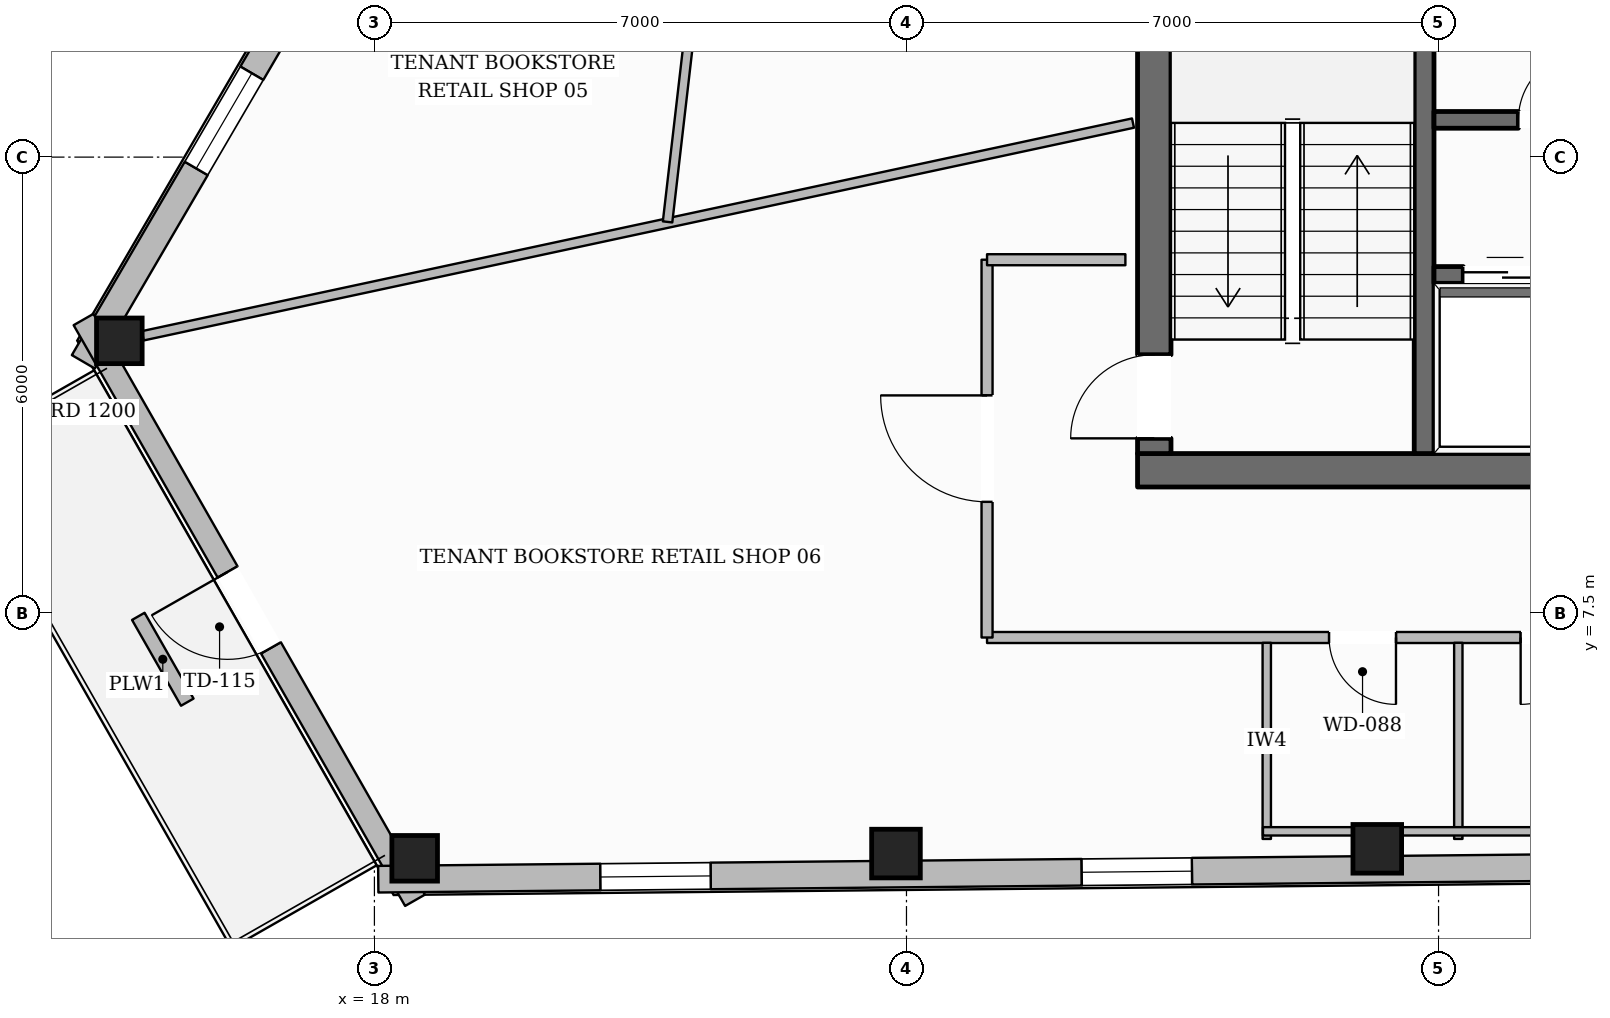
"""IFC4 building model, lengths in metres.
Left out: names, types, materials, properties, quantities, classifications, styles, units other than length and angle.
Written with IfcOpenShell. Run it as: python <this file> out.ifc"""

import sys

from ifc_helpers import new_model, si_unit, direction, frame, frame_2d, origin, origin_2d, place, context, subcontext, project, spatial, rectangle, hollow_rectangle, extrude, element, fill, save


model = new_model("IFC4")
c1 = context("Model", 3, precision=1e-05, world=origin(), true_north=direction((0.0, 1.0)))
c2 = subcontext(c1, "Body", "Model", "MODEL_VIEW")
j1 = project(units=[si_unit("LENGTHUNIT", "METRE"), si_unit("PLANEANGLEUNIT", "RADIAN")], contexts=[c1])
p1 = place(None, origin())
s1 = spatial("IfcSite", under=j1, at=p1, CompositionType="ELEMENT")
p2 = place(p1, origin())
s2 = spatial("IfcBuilding", under=s1, at=p2, CompositionType="ELEMENT")
p3 = place(p2, frame((0.0, 0.0, 218.9)))
s3 = spatial("IfcBuildingStorey", under=s2, at=p3, CompositionType="ELEMENT", Elevation=218.9)
p4 = place(p3, frame((28.04, 9.38, 0.0), z_axis=(0.0, 0.0, 1.0), x_axis=(1.0, 0.0, 0.0)))
e1 = element("IfcWall", 1, at=p4, inside=s3, PredefinedType="SOLIDWALL", context=c2, shape_type="SweptSolid", body=[
    extrude(rectangle(XDim=19.92, YDim=0.44, at=frame_2d((9.96, 0.0))), origin(), (0.0, 0.0, 1.0), 3.6),
])
p5 = place(p4, frame((10.46, 0.0, 0.0)))
e2 = element("IfcOpeningElement", 2, at=p5, cuts=e1, PredefinedType="OPENING", context=c2, shape_type="SweptSolid", body=[
    extrude(rectangle(XDim=1.4, YDim=2.2, at=frame_2d((0.7, 1.1))), frame((0.0, 0.23, 0.0), z_axis=(0.0, -1.0, 0.0), x_axis=(1.0, 0.0, 0.0)), (0.0, 0.0, 1.0), 0.46),
])
p6 = place(p3, frame((28.26, 9.6, 0.0), z_axis=(0.0, 0.0, 1.0), x_axis=(0.0, 1.0, 0.0)))
e3 = element("IfcWall", 3, at=p6, inside=s3, PredefinedType="SOLIDWALL", context=c2, shape_type="SweptSolid", body=[
    extrude(rectangle(XDim=13.0, YDim=0.44, at=frame_2d((6.5, 0.0))), origin(), (0.0, 0.0, 1.0), 3.6),
])
p7 = place(p6, frame((0.2, 0.0, 0.0)))
e4 = element("IfcOpeningElement", 4, at=p7, cuts=e3, PredefinedType="OPENING", context=c2, shape_type="SweptSolid", body=[
    extrude(rectangle(XDim=1.1, YDim=2.15, at=frame_2d((0.55, 1.075))), frame((0.0, 0.23, 0.0), z_axis=(0.0, -1.0, 0.0), x_axis=(1.0, 0.0, 0.0)), (0.0, 0.0, 1.0), 0.46),
])
p8 = place(p6, frame((8.4, 0.0, 0.0)))
e5 = element("IfcOpeningElement", 5, at=p8, cuts=e3, PredefinedType="OPENING", context=c2, shape_type="SweptSolid", body=[
    extrude(rectangle(XDim=0.9, YDim=2.1, at=frame_2d((0.45, 1.05))), frame((0.0, 0.23, 0.0), z_axis=(0.0, -1.0, 0.0), x_axis=(1.0, 0.0, 0.0)), (0.0, 0.0, 1.0), 0.46),
])
p9 = place(p3, frame((31.81, 9.6, 0.0), z_axis=(0.0, 0.0, 1.0), x_axis=(0.0, 1.0, 0.0)))
e6 = element("IfcWall", 6, at=p9, inside=s3, PredefinedType="SHEAR", context=c2, shape_type="SweptSolid", body=[
    extrude(rectangle(XDim=13.0, YDim=0.26, at=frame_2d((6.5, 0.0))), origin(), (0.0, 0.0, 1.0), 3.6),
])
p10 = place(p9, frame((10.925, 0.0, 0.0)))
e7 = element("IfcOpeningElement", 7, at=p10, cuts=e6, PredefinedType="OPENING", context=c2, shape_type="SweptSolid", body=[
    extrude(rectangle(XDim=1.25, YDim=2.25, at=frame_2d((0.625, 1.125))), frame((0.0, 0.14, 0.0), z_axis=(0.0, -1.0, 0.0), x_axis=(1.0, 0.0, 0.0)), (0.0, 0.0, 1.0), 0.28),
])
p11 = place(p3, frame((31.94, 13.99, 0.0), z_axis=(0.0, 0.0, 1.0), x_axis=(1.0, 0.0, 0.0)))
e8 = element("IfcWall", 8, at=p11, inside=s3, PredefinedType="SOLIDWALL", context=c2, shape_type="SweptSolid", body=[
    extrude(rectangle(XDim=12.12, YDim=0.22, at=frame_2d((6.06, 0.0))), origin(), (0.0, 0.0, 1.0), 3.6),
])
p12 = place(p11, frame((1.11, 0.0, 0.0)))
e9 = element("IfcOpeningElement", 9, at=p12, cuts=e8, PredefinedType="OPENING", context=c2, shape_type="SweptSolid", body=[
    extrude(rectangle(XDim=0.9, YDim=2.1, at=frame_2d((0.45, 1.05))), frame((0.0, 0.12, 0.0), z_axis=(0.0, -1.0, 0.0), x_axis=(1.0, 0.0, 0.0)), (0.0, 0.0, 1.0), 0.24),
])
p13 = place(p11, frame((5.16, 0.0, 0.0)))
e10 = element("IfcOpeningElement", 10, at=p13, cuts=e8, PredefinedType="OPENING", context=c2, shape_type="SweptSolid", body=[
    extrude(rectangle(XDim=0.9, YDim=2.1, at=frame_2d((0.45, 1.05))), frame((0.0, 0.12, 0.0), z_axis=(0.0, -1.0, 0.0), x_axis=(1.0, 0.0, 0.0)), (0.0, 0.0, 1.0), 0.24),
])
p14 = place(p11, frame((9.61, 0.0, 0.0)))
e11 = element("IfcOpeningElement", 11, at=p14, cuts=e8, PredefinedType="OPENING", context=c2, shape_type="SweptSolid", body=[
    extrude(rectangle(XDim=0.9, YDim=2.1, at=frame_2d((0.45, 1.05))), frame((0.0, 0.12, 0.0), z_axis=(0.0, -1.0, 0.0), x_axis=(1.0, 0.0, 0.0)), (0.0, 0.0, 1.0), 0.24),
])
p15 = place(p3, frame((31.94, 11.95, 0.0), z_axis=(0.0, 0.0, 1.0), x_axis=(1.0, 0.0, 0.0)))
e12 = element("IfcWall", 12, at=p15, inside=s3, PredefinedType="SOLIDWALL", context=c2, shape_type="SweptSolid", body=[
    extrude(rectangle(XDim=6.19, YDim=0.22, at=frame_2d((3.095, 0.0))), origin(), (0.0, 0.0, 1.0), 3.6),
])
p16 = place(p15, frame((0.385, 0.0, 0.0)))
e13 = element("IfcOpeningElement", 13, at=p16, cuts=e12, PredefinedType="OPENING", context=c2, shape_type="SweptSolid", body=[
    extrude(rectangle(XDim=1.1, YDim=2.2, at=frame_2d((0.55, 1.1))), frame((0.0, 0.12, 0.0), z_axis=(0.0, -1.0, 0.0), x_axis=(1.0, 0.0, 0.0)), (0.0, 0.0, 1.0), 0.24),
])
p17 = place(p15, frame((2.435, 0.0, 0.0)))
e14 = element("IfcOpeningElement", 14, at=p17, cuts=e12, PredefinedType="OPENING", context=c2, shape_type="SweptSolid", body=[
    extrude(rectangle(XDim=1.1, YDim=2.2, at=frame_2d((0.55, 1.1))), frame((0.0, 0.12, 0.0), z_axis=(0.0, -1.0, 0.0), x_axis=(1.0, 0.0, 0.0)), (0.0, 0.0, 1.0), 0.24),
])
p18 = place(p15, frame((4.485, 0.0, 0.0)))
e15 = element("IfcOpeningElement", 15, at=p18, cuts=e12, PredefinedType="OPENING", context=c2, shape_type="SweptSolid", body=[
    extrude(rectangle(XDim=1.1, YDim=2.2, at=frame_2d((0.55, 1.1))), frame((0.0, 0.12, 0.0), z_axis=(0.0, -1.0, 0.0), x_axis=(1.0, 0.0, 0.0)), (0.0, 0.0, 1.0), 0.24),
])
for number, where, z_axis, x_axis in (
    (16, (14.644, 11.083, 0.0), (0.0, 0.0, 1.0), (1.0, 0.0, 0.0)),
    (17, (18.53, 4.275, 0.0), (0.0, 0.0, 1.0), (1.0, 0.0, 0.0)),
):
    element("IfcColumn", number, at=place(p3, frame(where, z_axis=z_axis, x_axis=x_axis)), inside=s3, PredefinedType="COLUMN", context=c2, shape_type="SweptSolid", body=[
        extrude(hollow_rectangle(XDim=0.6, YDim=0.6, WallThickness=0.028, at=origin_2d()), origin(), (0.0, 0.0, 1.0), 3.6),
    ])
for number, where, z_axis, x_axis in (
    (18, (24.862, 4.337, 0.0), (0.0, 0.0, 1.0), (1.0, 0.0, 0.0)),
    (19, (31.194, 4.4, 0.0), (0.0, 0.0, 1.0), (1.0, 0.0, 0.0)),
):
    element("IfcColumn", number, at=place(p3, frame(where, z_axis=z_axis, x_axis=x_axis)), inside=s3, PredefinedType="COLUMN", context=c2, shape_type="SweptSolid", body=[
        extrude(hollow_rectangle(XDim=0.64, YDim=0.64, WallThickness=0.028, at=origin_2d()), origin(), (0.0, 0.0, 1.0), 3.6),
    ])
p19 = place(p3, frame((14.171, 10.807, 0.0), z_axis=(0.0, 0.0, 1.0), x_axis=(0.504226548845, 0.86357141421, 0.0)))
e20 = element("IfcWall", 20, at=p19, inside=s3, PredefinedType="STANDARD", context=c2, shape_type="SweptSolid", body=[
    extrude(rectangle(XDim=39.276, YDim=0.35, at=frame_2d((19.638, 0.0))), origin(), (0.0, 0.0, 1.0), 3.132),
])
p20 = place(p19, frame((34.885, 0.0, 0.65)))
e21 = element("IfcOpeningElement", 21, at=p20, cuts=e20, PredefinedType="OPENING", context=c2, shape_type="SweptSolid", body=[
    extrude(rectangle(XDim=1.45, YDim=1.75, at=frame_2d((0.725, 0.875))), frame((0.0, 0.185, 0.0), z_axis=(0.0, -1.0, 0.0), x_axis=(1.0, 0.0, 0.0)), (0.0, 0.0, 1.0), 0.37),
])
p21 = place(p19, frame((28.497, 0.0, 0.65)))
e22 = element("IfcOpeningElement", 22, at=p21, cuts=e20, PredefinedType="OPENING", context=c2, shape_type="SweptSolid", body=[
    extrude(rectangle(XDim=1.45, YDim=1.75, at=frame_2d((0.725, 0.875))), frame((0.0, 0.185, 0.0), z_axis=(0.0, -1.0, 0.0), x_axis=(1.0, 0.0, 0.0)), (0.0, 0.0, 1.0), 0.37),
])
p22 = place(p19, frame((15.722, 0.0, 0.65)))
e23 = element("IfcOpeningElement", 23, at=p22, cuts=e20, PredefinedType="OPENING", context=c2, shape_type="SweptSolid", body=[
    extrude(rectangle(XDim=1.45, YDim=1.75, at=frame_2d((0.725, 0.875))), frame((0.0, 0.185, 0.0), z_axis=(0.0, -1.0, 0.0), x_axis=(1.0, 0.0, 0.0)), (0.0, 0.0, 1.0), 0.37),
])
p23 = place(p19, frame((9.334, 0.0, 0.65)))
e24 = element("IfcOpeningElement", 24, at=p23, cuts=e20, PredefinedType="OPENING", context=c2, shape_type="SweptSolid", body=[
    extrude(rectangle(XDim=1.45, YDim=1.75, at=frame_2d((0.725, 0.875))), frame((0.0, 0.185, 0.0), z_axis=(0.0, -1.0, 0.0), x_axis=(1.0, 0.0, 0.0)), (0.0, 0.0, 1.0), 0.37),
])
p24 = place(p19, frame((2.946, 0.0, 0.65)))
e25 = element("IfcOpeningElement", 25, at=p24, cuts=e20, PredefinedType="OPENING", context=c2, shape_type="SweptSolid", body=[
    extrude(rectangle(XDim=1.45, YDim=1.75, at=frame_2d((0.725, 0.875))), frame((0.0, 0.185, 0.0), z_axis=(0.0, -1.0, 0.0), x_axis=(1.0, 0.0, 0.0)), (0.0, 0.0, 1.0), 0.37),
])
p25 = place(p3, frame((18.534, 3.723, 0.0), z_axis=(0.0, 0.0, 1.0), x_axis=(-0.495678638022, 0.86850600908, 0.0)))
e26 = element("IfcWall", 26, at=p25, inside=s3, PredefinedType="STANDARD", context=c2, shape_type="SweptSolid", body=[
    extrude(rectangle(XDim=8.798, YDim=0.3, at=frame_2d((4.399, 0.0))), origin(), (0.0, 0.0, 1.0), 3.132),
])
p26 = place(p25, frame((3.824, 0.0, 0.0)))
e27 = element("IfcOpeningElement", 27, at=p26, cuts=e26, PredefinedType="OPENING", context=c2, shape_type="SweptSolid", body=[
    extrude(rectangle(XDim=1.15, YDim=2.2, at=frame_2d((0.575, 1.1))), frame((0.0, 0.16, 0.0), z_axis=(0.0, -1.0, 0.0), x_axis=(1.0, 0.0, 0.0)), (0.0, 0.0, 1.0), 0.32),
])
p27 = place(p3, frame((56.998, 4.385, 0.0), z_axis=(0.0, 0.0, 1.0), x_axis=(-0.999951327982, -0.009866188108, 0.0)))
e28 = element("IfcWall", 28, at=p27, inside=s3, PredefinedType="STANDARD", context=c2, shape_type="SweptSolid", body=[
    extrude(rectangle(XDim=38.949, YDim=0.35, at=frame_2d((19.475, 0.0))), origin(), (0.0, 0.0, 1.0), 3.132),
])
p28 = place(p27, frame((34.576, 0.0, 0.65)))
e29 = element("IfcOpeningElement", 29, at=p28, cuts=e28, PredefinedType="OPENING", context=c2, shape_type="SweptSolid", body=[
    extrude(rectangle(XDim=1.45, YDim=1.75, at=frame_2d((0.725, 0.875))), frame((0.0, 0.185, 0.0), z_axis=(0.0, -1.0, 0.0), x_axis=(1.0, 0.0, 0.0)), (0.0, 0.0, 1.0), 0.37),
])
p29 = place(p27, frame((28.243, 0.0, 0.65)))
e30 = element("IfcOpeningElement", 30, at=p29, cuts=e28, PredefinedType="OPENING", context=c2, shape_type="SweptSolid", body=[
    extrude(rectangle(XDim=1.45, YDim=1.75, at=frame_2d((0.725, 0.875))), frame((0.0, 0.185, 0.0), z_axis=(0.0, -1.0, 0.0), x_axis=(1.0, 0.0, 0.0)), (0.0, 0.0, 1.0), 0.37),
])
p30 = place(p27, frame((15.579, 0.0, 0.65)))
e31 = element("IfcOpeningElement", 31, at=p30, cuts=e28, PredefinedType="OPENING", context=c2, shape_type="SweptSolid", body=[
    extrude(rectangle(XDim=1.45, YDim=1.75, at=frame_2d((0.725, 0.875))), frame((0.0, 0.185, 0.0), z_axis=(0.0, -1.0, 0.0), x_axis=(1.0, 0.0, 0.0)), (0.0, 0.0, 1.0), 0.37),
])
p31 = place(p27, frame((9.246, 0.0, 0.65)))
e32 = element("IfcOpeningElement", 32, at=p31, cuts=e28, PredefinedType="OPENING", context=c2, shape_type="SweptSolid", body=[
    extrude(rectangle(XDim=1.45, YDim=1.75, at=frame_2d((0.725, 0.875))), frame((0.0, 0.185, 0.0), z_axis=(0.0, -1.0, 0.0), x_axis=(1.0, 0.0, 0.0)), (0.0, 0.0, 1.0), 0.37),
])
p32 = place(p27, frame((2.914, 0.0, 0.65)))
e33 = element("IfcOpeningElement", 33, at=p32, cuts=e28, PredefinedType="OPENING", context=c2, shape_type="SweptSolid", body=[
    extrude(rectangle(XDim=1.45, YDim=1.75, at=frame_2d((0.725, 0.875))), frame((0.0, 0.185, 0.0), z_axis=(0.0, -1.0, 0.0), x_axis=(1.0, 0.0, 0.0)), (0.0, 0.0, 1.0), 0.37),
])
p33 = place(p3, frame((14.894, 7.458, 0.0), z_axis=(0.0, 0.0, 1.0), x_axis=(0.495592788195, -0.868555000152, 0.0)))
e34 = element("IfcWall", 34, at=p33, inside=s3, PredefinedType="USERDEFINED", context=c2, shape_type="SweptSolid", body=[
    extrude(rectangle(XDim=1.3, YDim=0.19, at=frame_2d((0.65, 0.0))), origin(), (0.0, 0.0, 1.0), 0.52),
])
p34 = place(p3, frame((49.94, 7.18, 0.0), z_axis=(0.0, 0.0, 1.0), x_axis=(-1.0, 0.0, 0.0)))
e35 = element("IfcWall", 35, at=p34, inside=s3, PredefinedType="PARTITIONING", context=c2, shape_type="SweptSolid", body=[
    extrude(rectangle(XDim=23.88, YDim=0.145, at=frame_2d((11.94, 0.0))), origin(), (0.0, 0.0, 1.0), 3.6),
])
p35 = place(p34, frame((18.5, 0.0, 0.0)))
e36 = element("IfcOpeningElement", 36, at=p35, cuts=e35, PredefinedType="OPENING", context=c2, shape_type="SweptSolid", body=[
    extrude(rectangle(XDim=0.88, YDim=2.1, at=frame_2d((0.44, 1.05))), frame((0.0, 0.083, 0.0), z_axis=(0.0, -1.0, 0.0), x_axis=(1.0, 0.0, 0.0)), (0.0, 0.0, 1.0), 0.165),
])
p36 = place(p34, frame((15.98, 0.0, 0.0)))
e37 = element("IfcOpeningElement", 37, at=p36, cuts=e35, PredefinedType="OPENING", context=c2, shape_type="SweptSolid", body=[
    extrude(rectangle(XDim=0.88, YDim=2.1, at=frame_2d((0.44, 1.05))), frame((0.0, 0.083, 0.0), z_axis=(0.0, -1.0, 0.0), x_axis=(1.0, 0.0, 0.0)), (0.0, 0.0, 1.0), 0.165),
])
p37 = place(p34, frame((13.52, 0.0, 0.0)))
e38 = element("IfcOpeningElement", 38, at=p37, cuts=e35, PredefinedType="OPENING", context=c2, shape_type="SweptSolid", body=[
    extrude(rectangle(XDim=0.96, YDim=2.1, at=frame_2d((0.48, 1.05))), frame((0.0, 0.083, 0.0), z_axis=(0.0, -1.0, 0.0), x_axis=(1.0, 0.0, 0.0)), (0.0, 0.0, 1.0), 0.165),
])
p38 = place(p34, frame((7.332, 0.0, 0.0)))
e39 = element("IfcOpeningElement", 39, at=p38, cuts=e35, PredefinedType="OPENING", context=c2, shape_type="SweptSolid", body=[
    extrude(rectangle(XDim=0.98, YDim=2.15, at=frame_2d((0.49, 1.075))), frame((0.0, 0.083, 0.0), z_axis=(0.0, -1.0, 0.0), x_axis=(1.0, 0.0, 0.0)), (0.0, 0.0, 1.0), 0.165),
])
p39 = place(p34, frame((0.707, 0.0, 0.0)))
e40 = element("IfcOpeningElement", 40, at=p39, cuts=e35, PredefinedType="OPENING", context=c2, shape_type="SweptSolid", body=[
    extrude(rectangle(XDim=0.98, YDim=2.15, at=frame_2d((0.49, 1.075))), frame((0.0, 0.083, 0.0), z_axis=(0.0, -1.0, 0.0), x_axis=(1.0, 0.0, 0.0)), (0.0, 0.0, 1.0), 0.165),
])
p40 = place(p3, frame((26.06, 7.18, 0.0), z_axis=(0.0, 0.0, 1.0), x_axis=(0.0, 1.0, 0.0)))
e41 = element("IfcWall", 41, at=p40, inside=s3, PredefinedType="PARTITIONING", context=c2, shape_type="SweptSolid", body=[
    extrude(rectangle(XDim=4.97, YDim=0.145, at=frame_2d((2.485, 0.0))), origin(), (0.0, 0.0, 1.0), 3.6),
])
p41 = place(p40, frame((1.785, 0.0, 0.0)))
e42 = element("IfcOpeningElement", 42, at=p41, cuts=e41, PredefinedType="OPENING", context=c2, shape_type="SweptSolid", body=[
    extrude(rectangle(XDim=1.4, YDim=2.2, at=frame_2d((0.7, 1.1))), frame((0.0, 0.083, 0.0), z_axis=(0.0, -1.0, 0.0), x_axis=(1.0, 0.0, 0.0)), (0.0, 0.0, 1.0), 0.165),
])
p42 = place(p3, frame((26.06, 12.15, 0.0), z_axis=(0.0, 0.0, 1.0), x_axis=(1.0, 0.0, 0.0)))
e43 = element("IfcWall", 43, at=p42, inside=s3, PredefinedType="PARTITIONING", context=c2, shape_type="SweptSolid", body=[
    extrude(rectangle(XDim=1.82, YDim=0.145, at=frame_2d((0.91, 0.0))), origin(), (0.0, 0.0, 1.0), 3.6),
])
for number, where, z_axis, x_axis in (
    (44, (29.74, 4.53, 0.0), (0.0, 0.0, 1.0), (0.0, 1.0, 0.0)),
    (45, (32.26, 4.53, 0.0), (0.0, 0.0, 1.0), (0.0, 1.0, 0.0)),
):
    element("IfcWall", number, at=place(p3, frame(where, z_axis=z_axis, x_axis=x_axis)), inside=s3, PredefinedType="PLUMBINGWALL", context=c2, shape_type="SweptSolid", body=[
        extrude(rectangle(XDim=2.58, YDim=0.11, at=frame_2d((1.29, 0.0))), origin(), (0.0, 0.0, 1.0), 3.6),
    ])
p43 = place(p3, frame((29.69, 4.63, 0.0), z_axis=(0.0, 0.0, 1.0), x_axis=(1.0, 0.0, 0.0)))
e46 = element("IfcWall", 46, at=p43, inside=s3, PredefinedType="PLUMBINGWALL", context=c2, shape_type="SweptSolid", body=[
    extrude(rectangle(XDim=7.46, YDim=0.11, at=frame_2d((3.73, 0.0))), origin(), (0.0, 0.0, 1.0), 3.135),
])
p44 = place(p3, frame((27.98, 13.948, 0.0), z_axis=(0.0, 0.0, 1.0), x_axis=(-0.977699064588, -0.210010807112, 0.0)))
e47 = element("IfcWall", 47, at=p44, inside=s3, PredefinedType="PARTITIONING", context=c2, shape_type="SweptSolid", body=[
    extrude(rectangle(XDim=13.325, YDim=0.125, at=frame_2d((6.662, 0.0))), origin(), (0.0, 0.0, 1.0), 3.141),
])
p45 = place(p3, frame((23.452, 26.405, 0.0), z_axis=(0.0, 0.0, 1.0), x_axis=(-0.11516270541, -0.993346642055, 0.0)))
e48 = element("IfcWall", 48, at=p45, inside=s3, PredefinedType="PARTITIONING", context=c2, shape_type="SweptSolid", body=[
    extrude(rectangle(XDim=13.85, YDim=0.125, at=frame_2d((6.925, 0.0))), origin(), (0.0, 0.0, 1.0), 3.135),
])
p46 = place(p45, frame((6.355, 0.0, 0.0)))
e49 = element("IfcOpeningElement", 49, at=p46, cuts=e48, PredefinedType="OPENING", context=c2, shape_type="SweptSolid", body=[
    extrude(rectangle(XDim=0.98, YDim=2.15, at=frame_2d((0.49, 1.075))), frame((0.0, 0.073, 0.0), z_axis=(0.0, -1.0, 0.0), x_axis=(1.0, 0.0, 0.0)), (0.0, 0.0, 1.0), 0.145),
])
p47 = place(p26, origin())
e50 = element("IfcDoor", 50, at=p47, inside=s3, OperationType="SINGLE_SWING_RIGHT", PredefinedType="DOOR", context=c2, shape_type="SweptSolid", body=[
    extrude(rectangle(XDim=1.15, YDim=2.2, at=frame_2d((0.575, 1.1))), frame((0.0, 0.025, 0.0), z_axis=(0.0, -1.0, 0.0), x_axis=(1.0, 0.0, 0.0)), (0.0, 0.0, 1.0), 0.05),
])
fill(e27, e50)
p48 = place(p24, origin())
e51 = element("IfcWindow", 51, at=p48, inside=s3, PartitioningType="SINGLE_PANEL", PredefinedType="WINDOW", context=c2, shape_type="SweptSolid", body=[
    extrude(rectangle(XDim=1.45, YDim=1.75, at=frame_2d((0.725, 0.875))), frame((0.0, 0.03, 0.0), z_axis=(0.0, -1.0, 0.0), x_axis=(1.0, 0.0, 0.0)), (0.0, 0.0, 1.0), 0.06),
])
fill(e25, e51)
p49 = place(p28, origin())
e52 = element("IfcWindow", 52, at=p49, inside=s3, PartitioningType="SINGLE_PANEL", PredefinedType="WINDOW", context=c2, shape_type="SweptSolid", body=[
    extrude(rectangle(XDim=1.45, YDim=1.75, at=frame_2d((0.725, 0.875))), frame((0.0, 0.03, 0.0), z_axis=(0.0, -1.0, 0.0), x_axis=(1.0, 0.0, 0.0)), (0.0, 0.0, 1.0), 0.06),
])
fill(e29, e52)
p50 = place(p29, origin())
e53 = element("IfcWindow", 53, at=p50, inside=s3, PartitioningType="SINGLE_PANEL", PredefinedType="WINDOW", context=c2, shape_type="SweptSolid", body=[
    extrude(rectangle(XDim=1.45, YDim=1.75, at=frame_2d((0.725, 0.875))), frame((0.0, 0.03, 0.0), z_axis=(0.0, -1.0, 0.0), x_axis=(1.0, 0.0, 0.0)), (0.0, 0.0, 1.0), 0.06),
])
fill(e30, e53)
p51 = place(p7, origin())
e54 = element("IfcDoor", 54, at=p51, inside=s3, OperationType="SINGLE_SWING_LEFT", PredefinedType="DOOR", context=c2, shape_type="SweptSolid", body=[
    extrude(rectangle(XDim=1.1, YDim=2.15, at=frame_2d((0.55, 1.075))), frame((0.0, 0.025, 0.0), z_axis=(0.0, -1.0, 0.0), x_axis=(1.0, 0.0, 0.0)), (0.0, 0.0, 1.0), 0.05),
])
fill(e4, e54)
p52 = place(p16, origin())
e55 = element("IfcDoor", 55, at=p52, inside=s3, OperationType="DOUBLE_DOOR_SLIDING", PredefinedType="DOOR", context=c2, shape_type="SweptSolid", body=[
    extrude(rectangle(XDim=1.1, YDim=2.2, at=frame_2d((0.55, 1.1))), frame((0.0, 0.025, 0.0), z_axis=(0.0, -1.0, 0.0), x_axis=(1.0, 0.0, 0.0)), (0.0, 0.0, 1.0), 0.05),
])
fill(e13, e55)
p53 = place(p12, origin())
e56 = element("IfcDoor", 56, at=p53, inside=s3, OperationType="SINGLE_SWING_RIGHT", PredefinedType="DOOR", context=c2, shape_type="SweptSolid", body=[
    extrude(rectangle(XDim=0.9, YDim=2.1, at=frame_2d((0.45, 1.05))), frame((0.0, 0.025, 0.0), z_axis=(0.0, -1.0, 0.0), x_axis=(1.0, 0.0, 0.0)), (0.0, 0.0, 1.0), 0.05),
])
fill(e9, e56)
p54 = place(p35, origin())
e57 = element("IfcDoor", 57, at=p54, inside=s3, OperationType="SINGLE_SWING_LEFT", PredefinedType="DOOR", context=c2, shape_type="SweptSolid", body=[
    extrude(rectangle(XDim=0.88, YDim=2.1, at=frame_2d((0.44, 1.05))), frame((0.0, 0.025, 0.0), z_axis=(0.0, -1.0, 0.0), x_axis=(1.0, 0.0, 0.0)), (0.0, 0.0, 1.0), 0.05),
])
fill(e36, e57)
p55 = place(p36, origin())
e58 = element("IfcDoor", 58, at=p55, inside=s3, OperationType="SINGLE_SWING_RIGHT", PredefinedType="DOOR", context=c2, shape_type="SweptSolid", body=[
    extrude(rectangle(XDim=0.88, YDim=2.1, at=frame_2d((0.44, 1.05))), frame((0.0, 0.025, 0.0), z_axis=(0.0, -1.0, 0.0), x_axis=(1.0, 0.0, 0.0)), (0.0, 0.0, 1.0), 0.05),
])
fill(e37, e58)
p56 = place(p41, origin())
e59 = element("IfcDoor", 59, at=p56, inside=s3, OperationType="SINGLE_SWING_RIGHT", PredefinedType="DOOR", context=c2, shape_type="SweptSolid", body=[
    extrude(rectangle(XDim=1.4, YDim=2.2, at=frame_2d((0.7, 1.1))), frame((0.0, 0.025, 0.0), z_axis=(0.0, -1.0, 0.0), x_axis=(1.0, 0.0, 0.0)), (0.0, 0.0, 1.0), 0.05),
])
fill(e42, e59)
save(model, sys.argv[1])
